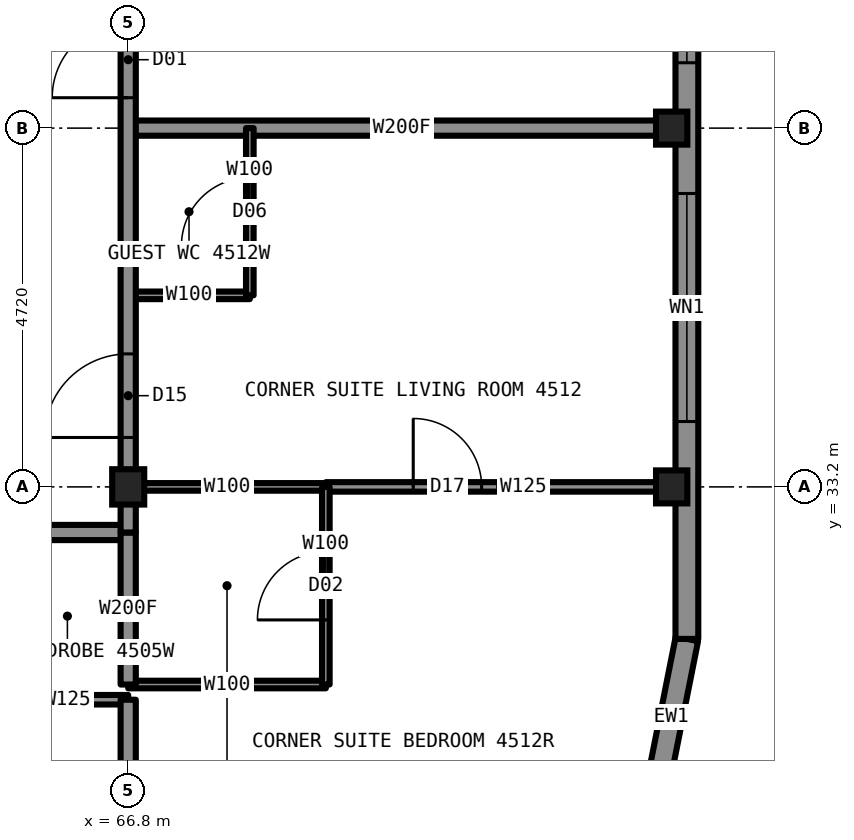
"""IFC4 building model, lengths in metres.
Left out: names, types, materials, properties, quantities, classifications, styles, units other than length and angle.
Written with IfcOpenShell. Run it as: python <this file> out.ifc"""

import sys

from ifc_helpers import new_model, si_unit, direction, frame, frame_2d, origin, origin_2d, place, context, subcontext, project, spatial, rectangle, i_section, extrude, element, fill, save


model = new_model("IFC4")
c1 = context("Model", 3, precision=1e-05, world=origin(), true_north=direction((0.0, 1.0)))
c2 = subcontext(c1, "Body", "Model", "MODEL_VIEW")
j1 = project(units=[si_unit("LENGTHUNIT", "METRE"), si_unit("PLANEANGLEUNIT", "RADIAN")], contexts=[c1])
p1 = place(None, origin())
s1 = spatial("IfcSite", under=j1, at=p1, CompositionType="ELEMENT")
p2 = place(p1, origin())
s2 = spatial("IfcBuilding", under=s1, at=p2, CompositionType="ELEMENT")
p3 = place(p2, frame((0.0, 0.0, 161.8)))
s3 = spatial("IfcBuildingStorey", under=s2, at=p3, CompositionType="ELEMENT", Elevation=161.8)
for number, where, z_axis, x_axis in (
    (1, (73.95, 33.2, 0.0), (0.0, 0.0, 1.0), (1.0, 0.0, 0.0)),
    (2, (73.95, 37.92, 0.0), (0.0, 0.0, 1.0), (1.0, 0.0, 0.0)),
):
    element("IfcColumn", number, at=place(p3, frame(where, z_axis=z_axis, x_axis=x_axis)), inside=s3, PredefinedType="COLUMN", context=c2, shape_type="SweptSolid", body=[
        extrude(i_section(OverallWidth=0.442, OverallDepth=0.531, WebThickness=0.066, FlangeThickness=0.106, at=origin_2d()), origin(), (0.0, 0.0, 1.0), 3.5),
    ])
p4 = place(p3, frame((66.8, 33.2, 0.0), z_axis=(0.0, 0.0, 1.0), x_axis=(1.0, 0.0, 0.0)))
e3 = element("IfcColumn", 3, at=p4, inside=s3, PredefinedType="COLUMN", context=c2, shape_type="SweptSolid", body=[
    extrude(i_section(OverallWidth=0.422, OverallDepth=0.465, WebThickness=0.045, FlangeThickness=0.073, at=origin_2d()), origin(), (0.0, 0.0, 1.0), 3.5),
])
p5 = place(p3, frame((66.8, 33.2, 0.0), z_axis=(0.0, 0.0, 1.0), x_axis=(1.0, 0.0, 0.0)))
e4 = element("IfcWall", 4, at=p5, inside=s3, PredefinedType="PARTITIONING", context=c2, shape_type="SweptSolid", body=[
    extrude(rectangle(XDim=2.6, YDim=0.1, at=frame_2d((1.3, 0.0))), origin(), (0.0, 0.0, 1.0), 2.573),
])
p6 = place(p3, frame((69.4, 33.2, 0.0), z_axis=(0.0, 0.0, 1.0), x_axis=(1.0, 0.0, 0.0)))
e5 = element("IfcWall", 5, at=p6, inside=s3, PredefinedType="PARTITIONING", context=c2, shape_type="SweptSolid", body=[
    extrude(rectangle(XDim=4.6, YDim=0.125, at=frame_2d((2.3, 0.0))), origin(), (0.0, 0.0, 1.0), 2.573),
])
p7 = place(p6, frame((1.15, 0.0, 0.0)))
e6 = element("IfcOpeningElement", 6, at=p7, cuts=e5, PredefinedType="OPENING", context=c2, shape_type="SweptSolid", body=[
    extrude(rectangle(XDim=0.9, YDim=2.2, at=frame_2d((0.45, 1.1))), frame((0.0, 0.073, 0.0), z_axis=(0.0, -1.0, 0.0), x_axis=(1.0, 0.0, 0.0)), (0.0, 0.0, 1.0), 0.145),
])
p8 = place(p3, frame((43.2, 32.6, 0.0), z_axis=(0.0, 0.0, 1.0), x_axis=(1.0, 0.0, 0.0)))
e7 = element("IfcWall", 7, at=p8, inside=s3, PredefinedType="PARTITIONING", context=c2, shape_type="SweptSolid", body=[
    extrude(rectangle(XDim=23.6, YDim=0.2, at=frame_2d((11.8, 0.0))), origin(), (0.0, 0.0, 1.0), 3.33),
])
p9 = place(p8, frame((3.0, 0.0, 0.0)))
e8 = element("IfcOpeningElement", 8, at=p9, cuts=e7, PredefinedType="OPENING", context=c2, shape_type="SweptSolid", body=[
    extrude(rectangle(XDim=1.0, YDim=2.2, at=frame_2d((0.5, 1.1))), frame((0.0, 0.11, 0.0), z_axis=(0.0, -1.0, 0.0), x_axis=(1.0, 0.0, 0.0)), (0.0, 0.0, 1.0), 0.22),
])
p10 = place(p8, frame((11.7, 0.0, 0.0)))
e9 = element("IfcOpeningElement", 9, at=p10, cuts=e7, PredefinedType="OPENING", context=c2, shape_type="SweptSolid", body=[
    extrude(rectangle(XDim=1.0, YDim=2.2, at=frame_2d((0.5, 1.1))), frame((0.0, 0.11, 0.0), z_axis=(0.0, -1.0, 0.0), x_axis=(1.0, 0.0, 0.0)), (0.0, 0.0, 1.0), 0.22),
])
p11 = place(p8, frame((17.16, 0.0, 0.0)))
e10 = element("IfcOpeningElement", 10, at=p11, cuts=e7, PredefinedType="OPENING", context=c2, shape_type="SweptSolid", body=[
    extrude(rectangle(XDim=1.0, YDim=2.2, at=frame_2d((0.5, 1.1))), frame((0.0, 0.11, 0.0), z_axis=(0.0, -1.0, 0.0), x_axis=(1.0, 0.0, 0.0)), (0.0, 0.0, 1.0), 0.22),
])
p12 = place(p3, frame((66.8, 30.6, 0.0), z_axis=(0.0, 0.0, 1.0), x_axis=(1.0, 0.0, 0.0)))
e11 = element("IfcWall", 11, at=p12, inside=s3, PredefinedType="PARTITIONING", context=c2, shape_type="SweptSolid", body=[
    extrude(rectangle(XDim=2.6, YDim=0.1, at=frame_2d((1.3, 0.0))), origin(), (0.0, 0.0, 1.0), 3.33),
])
p13 = place(p3, frame((65.2, 30.4, 0.0), z_axis=(0.0, 0.0, 1.0), x_axis=(1.0, 0.0, 0.0)))
e12 = element("IfcWall", 12, at=p13, inside=s3, PredefinedType="PARTITIONING", context=c2, shape_type="SweptSolid", body=[
    extrude(rectangle(XDim=1.6, YDim=0.125, at=frame_2d((0.8, 0.0))), origin(), (0.0, 0.0, 1.0), 3.33),
])
p14 = place(p3, frame((66.8, 37.92, 0.0), z_axis=(0.0, 0.0, 1.0), x_axis=(1.0, 0.0, 0.0)))
e13 = element("IfcWall", 13, at=p14, inside=s3, PredefinedType="PARTITIONING", context=c2, shape_type="SweptSolid", body=[
    extrude(rectangle(XDim=7.2, YDim=0.2, at=frame_2d((3.6, 0.0))), origin(), (0.0, 0.0, 1.0), 2.573),
])
p15 = place(p3, frame((66.8, 35.72, 0.0), z_axis=(0.0, 0.0, 1.0), x_axis=(1.0, 0.0, 0.0)))
e14 = element("IfcWall", 14, at=p15, inside=s3, PredefinedType="PARTITIONING", context=c2, shape_type="SweptSolid", body=[
    extrude(rectangle(XDim=1.6, YDim=0.1, at=frame_2d((0.8, 0.0))), origin(), (0.0, 0.0, 1.0), 3.33),
])
p16 = place(p3, frame((66.8, 33.22, 0.0), z_axis=(0.0, 0.0, 1.0), x_axis=(0.0, 1.0, 0.0)))
e15 = element("IfcWall", 15, at=p16, inside=s3, PredefinedType="PARTITIONING", context=c2, shape_type="SweptSolid", body=[
    extrude(rectangle(XDim=23.56, YDim=0.2, at=frame_2d((11.78, 0.0))), origin(), (0.0, 0.0, 1.0), 3.33),
])
p17 = place(p16, frame((5.1, 0.0, 0.0)))
e16 = element("IfcOpeningElement", 16, at=p17, cuts=e15, PredefinedType="OPENING", context=c2, shape_type="SweptSolid", body=[
    extrude(rectangle(XDim=1.0, YDim=2.2, at=frame_2d((0.5, 1.1))), frame((0.0, 0.11, 0.0), z_axis=(0.0, -1.0, 0.0), x_axis=(1.0, 0.0, 0.0)), (0.0, 0.0, 1.0), 0.22),
])
p18 = place(p16, frame((12.42, 0.0, 0.0)))
e17 = element("IfcOpeningElement", 17, at=p18, cuts=e15, PredefinedType="OPENING", context=c2, shape_type="SweptSolid", body=[
    extrude(rectangle(XDim=1.0, YDim=2.2, at=frame_2d((0.5, 1.1))), frame((0.0, 0.11, 0.0), z_axis=(0.0, -1.0, 0.0), x_axis=(1.0, 0.0, 0.0)), (0.0, 0.0, 1.0), 0.22),
])
p19 = place(p16, frame((22.03, 0.0, 0.0)))
e18 = element("IfcOpeningElement", 18, at=p19, cuts=e15, PredefinedType="OPENING", context=c2, shape_type="SweptSolid", body=[
    extrude(rectangle(XDim=1.1, YDim=2.2, at=frame_2d((0.55, 1.1))), frame((0.0, 0.11, 0.0), z_axis=(0.0, -1.0, 0.0), x_axis=(1.0, 0.0, 0.0)), (0.0, 0.0, 1.0), 0.22),
])
p20 = place(p16, frame((0.63, 0.0, 0.0)))
e19 = element("IfcOpeningElement", 19, at=p20, cuts=e15, PredefinedType="OPENING", context=c2, shape_type="SweptSolid", body=[
    extrude(rectangle(XDim=1.1, YDim=2.2, at=frame_2d((0.55, 1.1))), frame((0.0, 0.11, 0.0), z_axis=(0.0, -1.0, 0.0), x_axis=(1.0, 0.0, 0.0)), (0.0, 0.0, 1.0), 0.22),
])
p21 = place(p3, frame((66.8, 26.0, 0.0), z_axis=(0.0, 0.0, 1.0), x_axis=(0.0, 1.0, 0.0)))
e20 = element("IfcWall", 20, at=p21, inside=s3, PredefinedType="PARTITIONING", context=c2, shape_type="SweptSolid", body=[
    extrude(rectangle(XDim=4.4, YDim=0.2, at=frame_2d((2.2, 0.0))), origin(), (0.0, 0.0, 1.0), 2.573),
])
p22 = place(p3, frame((66.8, 30.6, 0.0), z_axis=(0.0, 0.0, 1.0), x_axis=(0.0, 1.0, 0.0)))
e21 = element("IfcWall", 21, at=p22, inside=s3, PredefinedType="PARTITIONING", context=c2, shape_type="SweptSolid", body=[
    extrude(rectangle(XDim=2.0, YDim=0.2, at=frame_2d((1.0, 0.0))), origin(), (0.0, 0.0, 1.0), 2.573),
])
p23 = place(p3, frame((68.4, 35.72, 0.0), z_axis=(0.0, 0.0, 1.0), x_axis=(0.0, 1.0, 0.0)))
e22 = element("IfcWall", 22, at=p23, inside=s3, PredefinedType="PARTITIONING", context=c2, shape_type="SweptSolid", body=[
    extrude(rectangle(XDim=2.2, YDim=0.1, at=frame_2d((1.1, 0.0))), origin(), (0.0, 0.0, 1.0), 3.33),
])
p24 = place(p23, frame((0.65, 0.0, 0.0)))
e23 = element("IfcOpeningElement", 23, at=p24, cuts=e22, PredefinedType="OPENING", context=c2, shape_type="SweptSolid", body=[
    extrude(rectangle(XDim=0.9, YDim=2.1, at=frame_2d((0.45, 1.05))), frame((0.0, 0.06, 0.0), z_axis=(0.0, -1.0, 0.0), x_axis=(1.0, 0.0, 0.0)), (0.0, 0.0, 1.0), 0.12),
])
p25 = place(p3, frame((69.4, 30.6, 0.0), z_axis=(0.0, 0.0, 1.0), x_axis=(0.0, 1.0, 0.0)))
e24 = element("IfcWall", 24, at=p25, inside=s3, PredefinedType="PARTITIONING", context=c2, shape_type="SweptSolid", body=[
    extrude(rectangle(XDim=2.6, YDim=0.1, at=frame_2d((1.3, 0.0))), origin(), (0.0, 0.0, 1.0), 3.33),
])
p26 = place(p25, frame((0.85, 0.0, 0.0)))
e25 = element("IfcOpeningElement", 25, at=p26, cuts=e24, PredefinedType="OPENING", context=c2, shape_type="SweptSolid", body=[
    extrude(rectangle(XDim=0.9, YDim=2.1, at=frame_2d((0.45, 1.05))), frame((0.0, 0.06, 0.0), z_axis=(0.0, -1.0, 0.0), x_axis=(1.0, 0.0, 0.0)), (0.0, 0.0, 1.0), 0.12),
])
p27 = place(p3, frame((73.743, 29.153, 0.0), z_axis=(0.0, 0.0, 1.0), x_axis=(0.195081421501, 0.980787050784, 0.0)))
e26 = element("IfcWall", 26, at=p27, inside=s3, PredefinedType="SOLIDWALL", context=c2, shape_type="SweptSolid", body=[
    extrude(rectangle(XDim=2.087, YDim=0.3, at=frame_2d((1.044, 0.0))), origin(), (0.0, 0.0, 1.0), 3.33),
])
p28 = place(p27, frame((0.444, 0.0, 0.3)))
e27 = element("IfcOpeningElement", 27, at=p28, cuts=e26, PredefinedType="OPENING", context=c2, shape_type="SweptSolid", body=[
    extrude(rectangle(XDim=1.2, YDim=2.0, at=frame_2d((0.6, 1.0))), frame((0.0, 0.16, 0.0), z_axis=(0.0, -1.0, 0.0), x_axis=(1.0, 0.0, 0.0)), (0.0, 0.0, 1.0), 0.32),
])
p29 = place(p3, frame((74.15, 31.2, 0.0), z_axis=(0.0, 0.0, 1.0), x_axis=(0.0, 1.0, 0.0)))
e28 = element("IfcWall", 28, at=p29, inside=s3, PredefinedType="SOLIDWALL", context=c2, shape_type="SweptSolid", body=[
    extrude(rectangle(XDim=27.6, YDim=0.3, at=frame_2d((13.8, 0.0))), origin(), (0.0, 0.0, 1.0), 2.83),
])
p30 = place(p29, frame((2.86, 0.0, 0.3)))
e29 = element("IfcOpeningElement", 29, at=p30, cuts=e28, PredefinedType="OPENING", context=c2, shape_type="SweptSolid", body=[
    extrude(rectangle(XDim=3.0, YDim=2.0, at=frame_2d((1.5, 1.0))), frame((0.0, 0.16, 0.0), z_axis=(0.0, -1.0, 0.0), x_axis=(1.0, 0.0, 0.0)), (0.0, 0.0, 1.0), 0.32),
])
p31 = place(p29, frame((7.58, 0.0, 0.3)))
e30 = element("IfcOpeningElement", 30, at=p31, cuts=e28, PredefinedType="OPENING", context=c2, shape_type="SweptSolid", body=[
    extrude(rectangle(XDim=3.0, YDim=2.0, at=frame_2d((1.5, 1.0))), frame((0.0, 0.16, 0.0), z_axis=(0.0, -1.0, 0.0), x_axis=(1.0, 0.0, 0.0)), (0.0, 0.0, 1.0), 0.32),
])
p32 = place(p29, frame((12.3, 0.0, 0.3)))
e31 = element("IfcOpeningElement", 31, at=p32, cuts=e28, PredefinedType="OPENING", context=c2, shape_type="SweptSolid", body=[
    extrude(rectangle(XDim=3.0, YDim=2.0, at=frame_2d((1.5, 1.0))), frame((0.0, 0.16, 0.0), z_axis=(0.0, -1.0, 0.0), x_axis=(1.0, 0.0, 0.0)), (0.0, 0.0, 1.0), 0.32),
])
p33 = place(p29, frame((17.02, 0.0, 0.3)))
e32 = element("IfcOpeningElement", 32, at=p33, cuts=e28, PredefinedType="OPENING", context=c2, shape_type="SweptSolid", body=[
    extrude(rectangle(XDim=3.0, YDim=2.0, at=frame_2d((1.5, 1.0))), frame((0.0, 0.16, 0.0), z_axis=(0.0, -1.0, 0.0), x_axis=(1.0, 0.0, 0.0)), (0.0, 0.0, 1.0), 0.32),
])
p34 = place(p29, frame((21.74, 0.0, 0.3)))
e33 = element("IfcOpeningElement", 33, at=p34, cuts=e28, PredefinedType="OPENING", context=c2, shape_type="SweptSolid", body=[
    extrude(rectangle(XDim=3.0, YDim=2.0, at=frame_2d((1.5, 1.0))), frame((0.0, 0.16, 0.0), z_axis=(0.0, -1.0, 0.0), x_axis=(1.0, 0.0, 0.0)), (0.0, 0.0, 1.0), 0.32),
])
p35 = place(p3, frame((66.8, 32.6, 0.0), z_axis=(0.0, 0.0, 1.0), x_axis=(0.0, 1.0, 0.0)))
e34 = element("IfcWall", 34, at=p35, inside=s3, PredefinedType="PARTITIONING", context=c2, shape_type="SweptSolid", body=[
    extrude(rectangle(XDim=0.62, YDim=0.2, at=frame_2d((0.31, 0.0))), origin(), (0.0, 0.0, 1.0), 2.573),
])
p36 = place(p17, origin())
e35 = element("IfcDoor", 35, at=p36, inside=s3, OperationType="SINGLE_SWING_LEFT", PredefinedType="DOOR", context=c2, shape_type="SweptSolid", body=[
    extrude(rectangle(XDim=1.0, YDim=2.2, at=frame_2d((0.5, 1.1))), frame((0.0, 0.025, 0.0), z_axis=(0.0, -1.0, 0.0), x_axis=(1.0, 0.0, 0.0)), (0.0, 0.0, 1.0), 0.05),
])
fill(e16, e35)
p37 = place(p20, origin())
e36 = element("IfcDoor", 36, at=p37, inside=s3, OperationType="SINGLE_SWING_LEFT", PredefinedType="DOOR", context=c2, shape_type="SweptSolid", body=[
    extrude(rectangle(XDim=1.1, YDim=2.2, at=frame_2d((0.55, 1.1))), frame((0.0, 0.025, 0.0), z_axis=(0.0, -1.0, 0.0), x_axis=(1.0, 0.0, 0.0)), (0.0, 0.0, 1.0), 0.05),
])
fill(e19, e36)
p38 = place(p26, origin())
e37 = element("IfcDoor", 37, at=p38, inside=s3, OperationType="SINGLE_SWING_RIGHT", PredefinedType="DOOR", context=c2, shape_type="SweptSolid", body=[
    extrude(rectangle(XDim=0.9, YDim=2.1, at=frame_2d((0.45, 1.05))), frame((0.0, 0.025, 0.0), z_axis=(0.0, -1.0, 0.0), x_axis=(1.0, 0.0, 0.0)), (0.0, 0.0, 1.0), 0.05),
])
fill(e25, e37)
p39 = place(p7, origin())
e38 = element("IfcDoor", 38, at=p39, inside=s3, OperationType="SINGLE_SWING_LEFT", PredefinedType="DOOR", context=c2, shape_type="SweptSolid", body=[
    extrude(rectangle(XDim=0.9, YDim=2.2, at=frame_2d((0.45, 1.1))), frame((0.0, 0.025, 0.0), z_axis=(0.0, -1.0, 0.0), x_axis=(1.0, 0.0, 0.0)), (0.0, 0.0, 1.0), 0.05),
])
fill(e6, e38)
p40 = place(p24, origin())
e39 = element("IfcDoor", 39, at=p40, inside=s3, OperationType="SINGLE_SWING_LEFT", PredefinedType="DOOR", context=c2, shape_type="SweptSolid", body=[
    extrude(rectangle(XDim=0.9, YDim=2.1, at=frame_2d((0.45, 1.05))), frame((0.0, 0.025, 0.0), z_axis=(0.0, -1.0, 0.0), x_axis=(1.0, 0.0, 0.0)), (0.0, 0.0, 1.0), 0.05),
])
fill(e23, e39)
p41 = place(p28, origin())
e40 = element("IfcWindow", 40, at=p41, inside=s3, PartitioningType="SINGLE_PANEL", PredefinedType="WINDOW", context=c2, shape_type="SweptSolid", body=[
    extrude(rectangle(XDim=1.2, YDim=2.0, at=frame_2d((0.6, 1.0))), frame((0.0, 0.13, 0.0), z_axis=(0.0, -1.0, 0.0), x_axis=(1.0, 0.0, 0.0)), (0.0, 0.0, 1.0), 0.06),
])
fill(e27, e40)
p42 = place(p30, origin())
e41 = element("IfcWindow", 41, at=p42, inside=s3, PartitioningType="SINGLE_PANEL", PredefinedType="WINDOW", context=c2, shape_type="SweptSolid", body=[
    extrude(rectangle(XDim=3.0, YDim=2.0, at=frame_2d((1.5, 1.0))), frame((0.0, 0.13, 0.0), z_axis=(0.0, -1.0, 0.0), x_axis=(1.0, 0.0, 0.0)), (0.0, 0.0, 1.0), 0.06),
])
fill(e29, e41)
p43 = place(p31, origin())
e42 = element("IfcWindow", 42, at=p43, inside=s3, PartitioningType="SINGLE_PANEL", PredefinedType="WINDOW", context=c2, shape_type="SweptSolid", body=[
    extrude(rectangle(XDim=3.0, YDim=2.0, at=frame_2d((1.5, 1.0))), frame((0.0, 0.13, 0.0), z_axis=(0.0, -1.0, 0.0), x_axis=(1.0, 0.0, 0.0)), (0.0, 0.0, 1.0), 0.06),
])
fill(e30, e42)
save(model, sys.argv[1])
